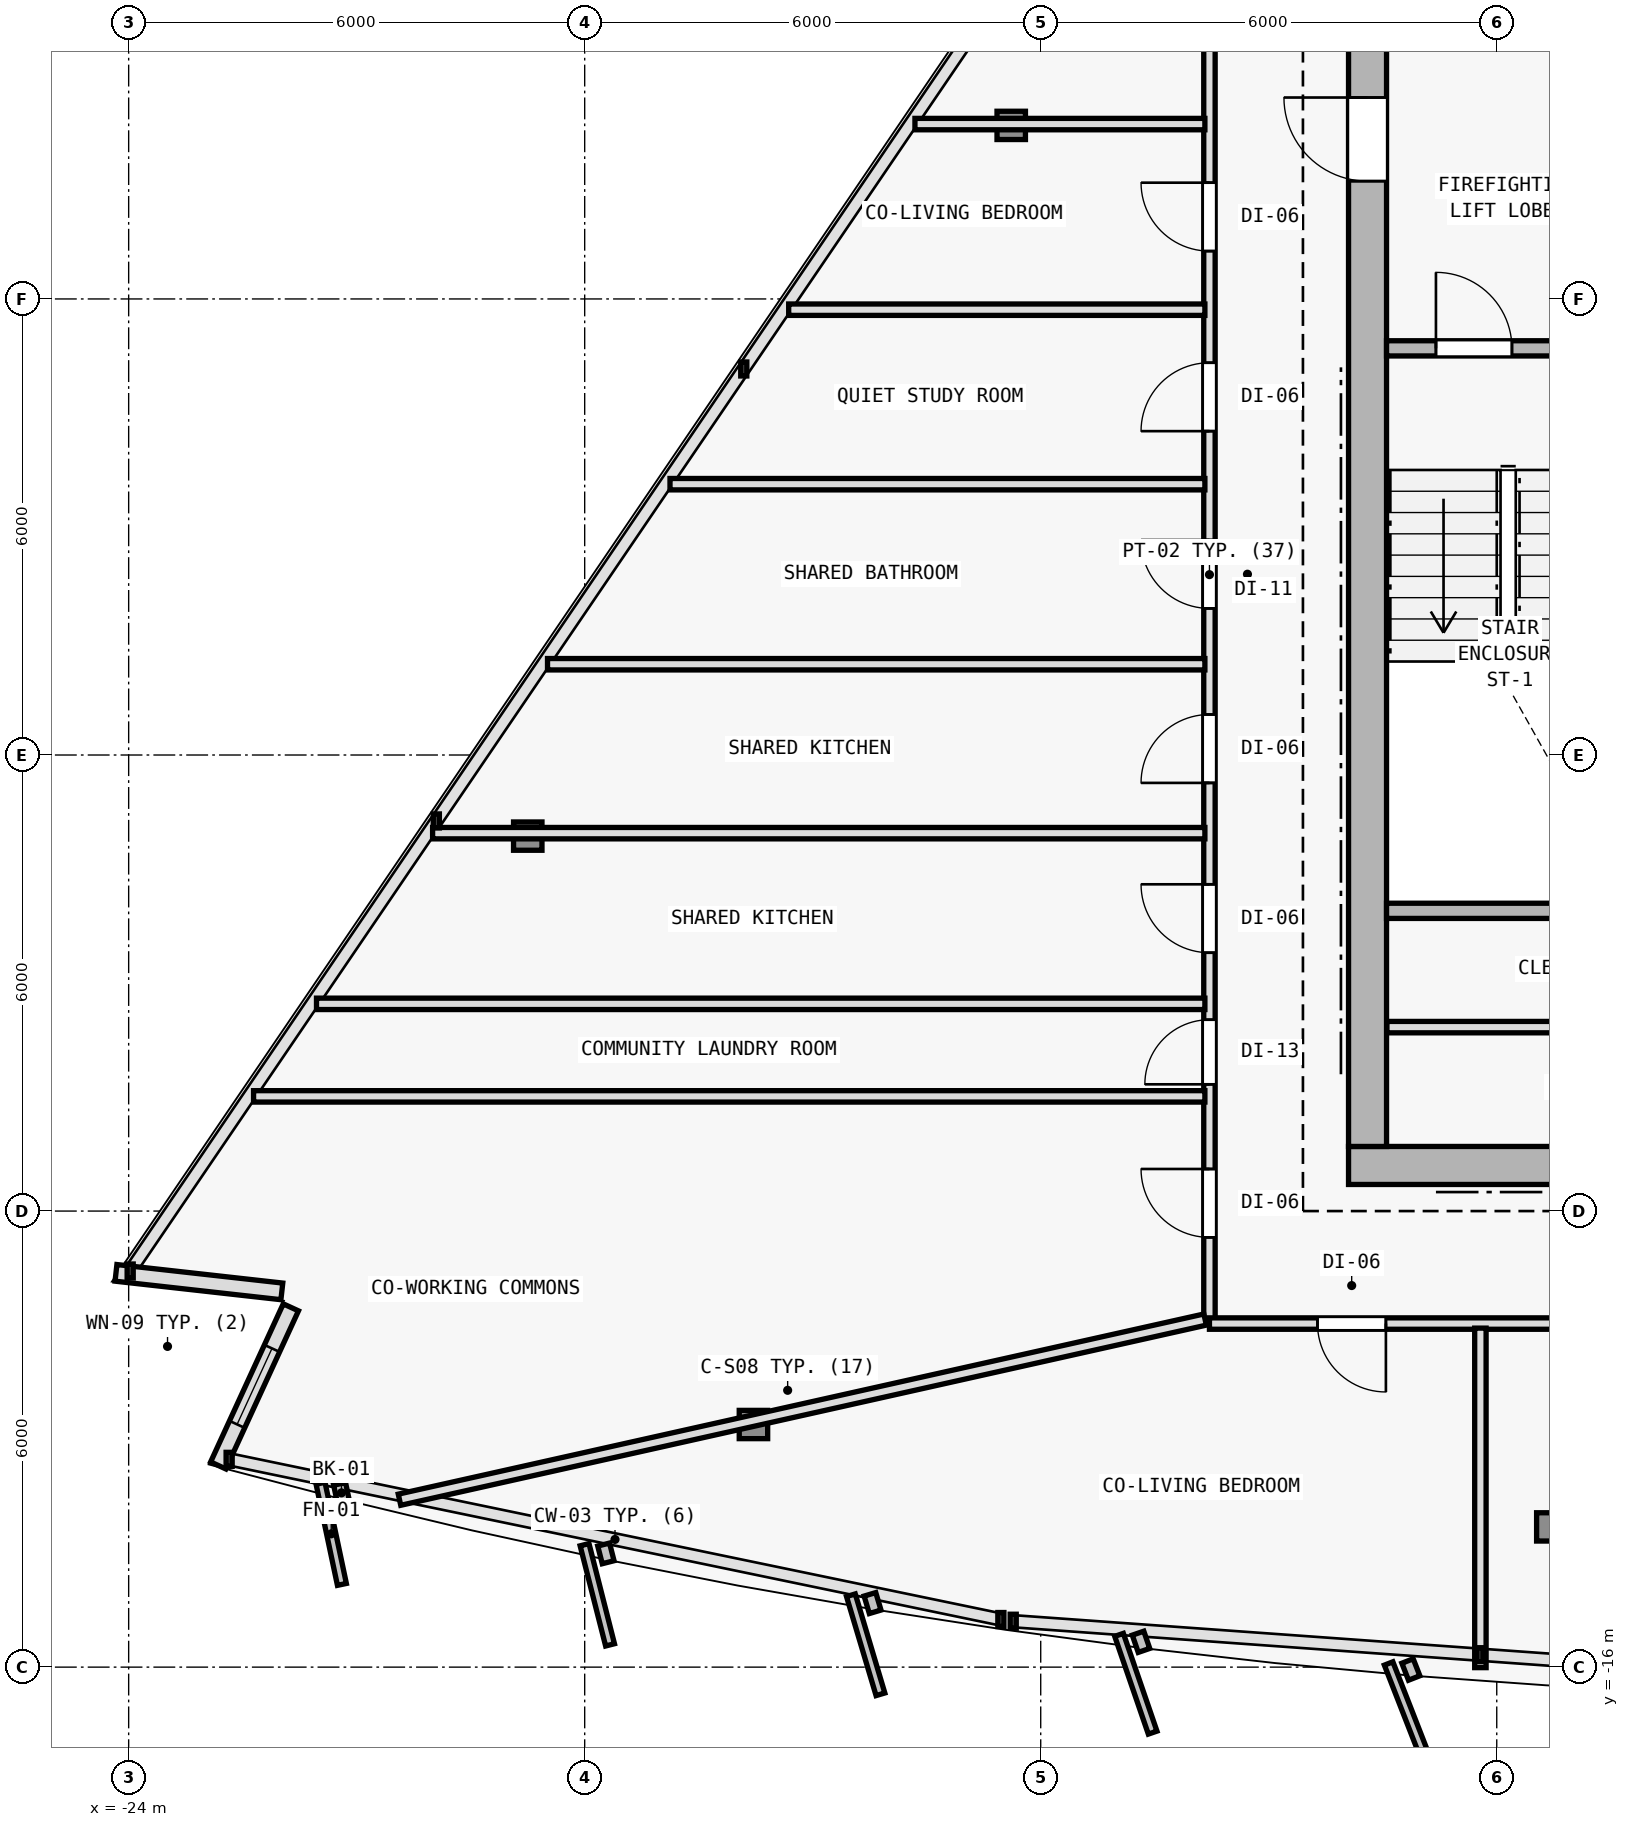
"""IFC4 building model, lengths in metres.
Left out: names, types, materials, properties, quantities, classifications, styles, units other than length and angle.
Written with IfcOpenShell. Run it as: python <this file> out.ifc"""

import sys

from ifc_helpers import new_model, si_unit, direction, frame, frame_2d, origin, origin_2d, place, context, subcontext, project, spatial, rectangle, i_section, extrude, element, fill, save


model = new_model("IFC4")
c1 = context("Model", 3, precision=1e-05, world=origin(), true_north=direction((0.0, 1.0)))
c2 = subcontext(c1, "Body", "Model", "MODEL_VIEW")
j1 = project(units=[si_unit("LENGTHUNIT", "METRE"), si_unit("PLANEANGLEUNIT", "RADIAN")], contexts=[c1])
p1 = place(None, origin())
s1 = spatial("IfcSite", under=j1, at=p1, CompositionType="ELEMENT")
p2 = place(p1, origin())
s2 = spatial("IfcBuilding", under=s1, at=p2, CompositionType="ELEMENT")
p3 = place(p2, frame((0.0, 0.0, 258.0)))
s3 = spatial("IfcBuildingStorey", under=s2, at=p3, CompositionType="ELEMENT", Elevation=258.0)
for number, where, z_axis, x_axis in (
    (1, (-7.7, -9.4, 0.0), (0.0, 0.0, 1.0), (1.0, 0.0, 0.0)),
    (2, (-7.7, 2.0, 0.0), (0.0, 0.0, 1.0), (1.0, 0.0, 0.0)),
):
    element("IfcColumn", number, at=place(p3, frame(where, z_axis=z_axis, x_axis=x_axis)), inside=s3, PredefinedType="COLUMN", context=c2, shape_type="SweptSolid", body=[
        extrude(i_section(OverallWidth=0.374, OverallDepth=0.372, WebThickness=0.012, FlangeThickness=0.02, FilletRadius=0.015, at=origin_2d()), origin(), (0.0, 0.0, 1.0), 3.6),
    ])
p4 = place(p3, frame((-15.78, -12.808, 0.006), z_axis=(0.020596292833, 0.033511459955, 0.999226087917), x_axis=(-0.851954850327, 0.523615252838, 0.0)))
e3 = element("IfcColumn", 3, at=p4, inside=s3, PredefinedType="COLUMN", context=c2, shape_type="SweptSolid", body=[
    extrude(i_section(OverallWidth=0.374, OverallDepth=0.372, WebThickness=0.012, FlangeThickness=0.02, FilletRadius=0.015, at=origin_2d()), origin(), (0.0, 0.0, 1.0), 3.592),
])
p5 = place(p3, frame((-5.289, -14.155, 0.006), z_axis=(0.006934288159, 0.035283289748, 0.999353293441), x_axis=(-0.981229659911, 0.192842823335, 0.0)))
e4 = element("IfcColumn", 4, at=p5, inside=s3, PredefinedType="COLUMN", context=c2, shape_type="SweptSolid", body=[
    extrude(i_section(OverallWidth=0.374, OverallDepth=0.372, WebThickness=0.012, FlangeThickness=0.02, FilletRadius=0.015, at=origin_2d()), origin(), (0.0, 0.0, 1.0), 3.591),
])
p6 = place(p3, frame((-12.388, 4.283, 0.006), z_axis=(0.017003572908, 0.009522000828, 0.999810086971), x_axis=(-0.488603368932, 0.87250601595, 0.0)))
e5 = element("IfcColumn", 5, at=p6, inside=s3, PredefinedType="COLUMN", context=c2, shape_type="SweptSolid", body=[
    extrude(i_section(OverallWidth=0.374, OverallDepth=0.372, WebThickness=0.012, FlangeThickness=0.02, FilletRadius=0.015, at=origin_2d()), origin(), (0.0, 0.0, 1.0), 3.59),
])
p7 = place(p3, frame((-18.749, -5.067, 0.006), z_axis=(0.025292109804, 0.02162067451, 0.999446274502), x_axis=(-0.649781149204, 0.760121344352, 0.0)))
e6 = element("IfcColumn", 6, at=p7, inside=s3, PredefinedType="COLUMN", context=c2, shape_type="SweptSolid", body=[
    extrude(i_section(OverallWidth=0.374, OverallDepth=0.372, WebThickness=0.012, FlangeThickness=0.02, FilletRadius=0.015, at=origin_2d()), origin(), (0.0, 0.0, 1.0), 3.591),
])
p8 = place(p3, frame((-21.985, -11.057, 0.0), z_axis=(0.0, 0.0, 1.0), x_axis=(-0.993823926228, 0.110968480463, 0.0)))
e7 = element("IfcWall", 7, at=p8, inside=s3, PredefinedType="SOLIDWALL", context=c2, shape_type="SweptSolid", body=[
    extrude(rectangle(XDim=2.196, YDim=0.22, at=frame_2d((1.098, 0.0))), origin(), (0.0, 0.0, 1.0), 3.35),
])
p9 = place(p3, frame((-22.822, -13.347, 0.0), z_axis=(0.0, 0.0, 1.0), x_axis=(0.417447808253, 0.908700900949, 0.0)))
e8 = element("IfcWall", 8, at=p9, inside=s3, PredefinedType="SOLIDWALL", context=c2, shape_type="SweptSolid", body=[
    extrude(rectangle(XDim=2.289, YDim=0.22, at=frame_2d((1.145, 0.0))), origin(), (0.0, 0.0, 1.0), 3.35),
])
p10 = place(p9, frame((0.594, 0.0, 0.62)))
e9 = element("IfcOpeningElement", 9, at=p10, cuts=e8, PredefinedType="OPENING", context=c2, shape_type="SweptSolid", body=[
    extrude(rectangle(XDim=1.1, YDim=1.8, at=frame_2d((0.55, 0.9))), frame((0.0, 0.12, 0.0), z_axis=(0.0, -1.0, 0.0), x_axis=(1.0, 0.0, 0.0)), (0.0, 0.0, 1.0), 0.24),
])
p11 = place(p3, frame((-7.95, -9.4, 0.0), z_axis=(0.0, 0.0, 1.0), x_axis=(1.0, 0.0, 0.0)))
e10 = element("IfcWall", 10, at=p11, inside=s3, PredefinedType="SHEAR", context=c2, shape_type="SweptSolid", body=[
    extrude(rectangle(XDim=15.9, YDim=0.5, at=frame_2d((7.95, 0.0))), origin(), (0.0, 0.0, 1.0), 3.35),
])
p12 = place(p11, frame((9.6, 0.0, 0.0)))
e11 = element("IfcOpeningElement", 11, at=p12, cuts=e10, PredefinedType="OPENING", context=c2, shape_type="SweptSolid", body=[
    extrude(rectangle(XDim=1.5, YDim=2.2, at=frame_2d((0.75, 1.1))), frame((0.0, 0.26, 0.0), z_axis=(0.0, -1.0, 0.0), x_axis=(1.0, 0.0, 0.0)), (0.0, 0.0, 1.0), 0.52),
])
p13 = place(p3, frame((-7.7, -9.15, 0.0), z_axis=(0.0, 0.0, 1.0), x_axis=(0.0, 1.0, 0.0)))
e12 = element("IfcWall", 12, at=p13, inside=s3, PredefinedType="SHEAR", context=c2, shape_type="SweptSolid", body=[
    extrude(rectangle(XDim=19.1, YDim=0.5, at=frame_2d((9.55, 0.0))), origin(), (0.0, 0.0, 1.0), 3.35),
])
p14 = place(p13, frame((12.7, 0.0, 0.0)))
e13 = element("IfcOpeningElement", 13, at=p14, cuts=e12, PredefinedType="OPENING", context=c2, shape_type="SweptSolid", body=[
    extrude(rectangle(XDim=1.1, YDim=2.15, at=frame_2d((0.55, 1.075))), frame((0.0, 0.26, 0.0), z_axis=(0.0, -1.0, 0.0), x_axis=(1.0, 0.0, 0.0)), (0.0, 0.0, 1.0), 0.52),
])
p15 = place(p3, frame((-7.45, 1.35, 0.0), z_axis=(0.0, 0.0, 1.0), x_axis=(1.0, 0.0, 0.0)))
e14 = element("IfcWall", 14, at=p15, inside=s3, PredefinedType="SOLIDWALL", context=c2, shape_type="SweptSolid", body=[
    extrude(rectangle(XDim=3.4, YDim=0.2, at=frame_2d((1.7, 0.0))), origin(), (0.0, 0.0, 1.0), 3.35),
])
p16 = place(p15, frame((0.65, 0.0, 0.0)))
e15 = element("IfcOpeningElement", 15, at=p16, cuts=e14, PredefinedType="OPENING", context=c2, shape_type="SweptSolid", body=[
    extrude(rectangle(XDim=1.0, YDim=2.15, at=frame_2d((0.5, 1.075))), frame((0.0, 0.11, 0.0), z_axis=(0.0, -1.0, 0.0), x_axis=(1.0, 0.0, 0.0)), (0.0, 0.0, 1.0), 0.22),
])
p17 = place(p3, frame((-7.45, -6.05, 0.0), z_axis=(0.0, 0.0, 1.0), x_axis=(1.0, 0.0, 0.0)))
e16 = element("IfcWall", 16, at=p17, inside=s3, PredefinedType="SOLIDWALL", context=c2, shape_type="SweptSolid", body=[
    extrude(rectangle(XDim=3.4, YDim=0.2, at=frame_2d((1.7, 0.0))), origin(), (0.0, 0.0, 1.0), 3.35),
])
p18 = place(p3, frame((-7.445, -7.58, 0.0), z_axis=(0.0, 0.0, 1.0), x_axis=(1.0, 0.0, 0.0)))
e17 = element("IfcWall", 17, at=p18, inside=s3, PredefinedType="PARTITIONING", context=c2, shape_type="SweptSolid", body=[
    extrude(rectangle(XDim=6.195, YDim=0.15, at=frame_2d((3.098, 0.0))), origin(), (0.0, 0.0, 1.0), 3.35),
])
p19 = place(p3, frame((-9.78, -11.48, 0.0), z_axis=(0.0, 0.0, 1.0), x_axis=(0.0, 1.0, 0.0)))
e18 = element("IfcWall", 18, at=p19, inside=s3, PredefinedType="PARTITIONING", context=c2, shape_type="SweptSolid", body=[
    extrude(rectangle(XDim=19.706, YDim=0.15, at=frame_2d((9.853, 0.0))), origin(), (0.0, 0.0, 1.0), 2.875),
])
p20 = place(p19, frame((9.409, 0.0, 0.0)))
e19 = element("IfcOpeningElement", 19, at=p20, cuts=e18, PredefinedType="OPENING", context=c2, shape_type="SweptSolid", body=[
    extrude(rectangle(XDim=0.9, YDim=2.1, at=frame_2d((0.45, 1.05))), frame((0.0, 0.085, 0.0), z_axis=(0.0, -1.0, 0.0), x_axis=(1.0, 0.0, 0.0)), (0.0, 0.0, 1.0), 0.17),
])
p21 = place(p19, frame((7.113, 0.0, 0.0)))
e20 = element("IfcOpeningElement", 20, at=p21, cuts=e18, PredefinedType="OPENING", context=c2, shape_type="SweptSolid", body=[
    extrude(rectangle(XDim=0.9, YDim=2.1, at=frame_2d((0.45, 1.05))), frame((0.0, 0.085, 0.0), z_axis=(0.0, -1.0, 0.0), x_axis=(1.0, 0.0, 0.0)), (0.0, 0.0, 1.0), 0.17),
])
p22 = place(p19, frame((4.879, 0.0, 0.0)))
e21 = element("IfcOpeningElement", 21, at=p22, cuts=e18, PredefinedType="OPENING", context=c2, shape_type="SweptSolid", body=[
    extrude(rectangle(XDim=0.9, YDim=2.1, at=frame_2d((0.45, 1.05))), frame((0.0, 0.085, 0.0), z_axis=(0.0, -1.0, 0.0), x_axis=(1.0, 0.0, 0.0)), (0.0, 0.0, 1.0), 0.17),
])
p23 = place(p19, frame((3.148, 0.0, 0.0)))
e22 = element("IfcOpeningElement", 22, at=p23, cuts=e18, PredefinedType="OPENING", context=c2, shape_type="SweptSolid", body=[
    extrude(rectangle(XDim=0.85, YDim=2.1, at=frame_2d((0.425, 1.05))), frame((0.0, 0.085, 0.0), z_axis=(0.0, -1.0, 0.0), x_axis=(1.0, 0.0, 0.0)), (0.0, 0.0, 1.0), 0.17),
])
p24 = place(p19, frame((1.134, 0.0, 0.0)))
e23 = element("IfcOpeningElement", 23, at=p24, cuts=e18, PredefinedType="OPENING", context=c2, shape_type="SweptSolid", body=[
    extrude(rectangle(XDim=0.9, YDim=2.1, at=frame_2d((0.45, 1.05))), frame((0.0, 0.085, 0.0), z_axis=(0.0, -1.0, 0.0), x_axis=(1.0, 0.0, 0.0)), (0.0, 0.0, 1.0), 0.17),
])
p25 = place(p19, frame((14.11, 0.0, 0.0)))
e24 = element("IfcOpeningElement", 24, at=p25, cuts=e18, PredefinedType="OPENING", context=c2, shape_type="SweptSolid", body=[
    extrude(rectangle(XDim=0.9, YDim=2.1, at=frame_2d((0.45, 1.05))), frame((0.0, 0.085, 0.0), z_axis=(0.0, -1.0, 0.0), x_axis=(1.0, 0.0, 0.0)), (0.0, 0.0, 1.0), 0.17),
])
p26 = place(p19, frame((11.741, 0.0, 0.0)))
e25 = element("IfcOpeningElement", 25, at=p26, cuts=e18, PredefinedType="OPENING", context=c2, shape_type="SweptSolid", body=[
    extrude(rectangle(XDim=0.9, YDim=2.1, at=frame_2d((0.45, 1.05))), frame((0.0, 0.085, 0.0), z_axis=(0.0, -1.0, 0.0), x_axis=(1.0, 0.0, 0.0)), (0.0, 0.0, 1.0), 0.17),
])
p27 = place(p3, frame((9.78, -11.48, 0.0), z_axis=(0.0, 0.0, 1.0), x_axis=(-1.0, 0.0, 0.0)))
e26 = element("IfcWall", 26, at=p27, inside=s3, PredefinedType="PARTITIONING", context=c2, shape_type="SweptSolid", body=[
    extrude(rectangle(XDim=19.56, YDim=0.15, at=frame_2d((9.78, 0.0))), origin(), (0.0, 0.0, 1.0), 2.725),
])
p28 = place(p27, frame((17.239, 0.0, 0.0)))
e27 = element("IfcOpeningElement", 27, at=p28, cuts=e26, PredefinedType="OPENING", context=c2, shape_type="SweptSolid", body=[
    extrude(rectangle(XDim=0.9, YDim=2.1, at=frame_2d((0.45, 1.05))), frame((0.0, 0.085, 0.0), z_axis=(0.0, -1.0, 0.0), x_axis=(1.0, 0.0, 0.0)), (0.0, 0.0, 1.0), 0.17),
])
p29 = place(p27, frame((9.8, 0.0, 0.0)))
e28 = element("IfcOpeningElement", 28, at=p29, cuts=e26, PredefinedType="OPENING", context=c2, shape_type="SweptSolid", body=[
    extrude(rectangle(XDim=0.9, YDim=2.1, at=frame_2d((0.45, 1.05))), frame((0.0, 0.085, 0.0), z_axis=(0.0, -1.0, 0.0), x_axis=(1.0, 0.0, 0.0)), (0.0, 0.0, 1.0), 0.17),
])
p30 = place(p27, frame((1.891, 0.0, 0.0)))
e29 = element("IfcOpeningElement", 29, at=p30, cuts=e26, PredefinedType="OPENING", context=c2, shape_type="SweptSolid", body=[
    extrude(rectangle(XDim=0.9, YDim=2.1, at=frame_2d((0.45, 1.05))), frame((0.0, 0.085, 0.0), z_axis=(0.0, -1.0, 0.0), x_axis=(1.0, 0.0, 0.0)), (0.0, 0.0, 1.0), 0.17),
])
p31 = place(p3, frame((-9.837, -11.427, 0.0), z_axis=(0.0, 0.0, 1.0), x_axis=(-0.975894754953, -0.218241671676, 0.0)))
e30 = element("IfcWall", 30, at=p31, inside=s3, PredefinedType="PARTITIONING", context=c2, shape_type="SweptSolid", body=[
    extrude(rectangle(XDim=10.861, YDim=0.15, at=frame_2d((5.431, 0.0))), origin(), (0.0, 0.0, 1.0), 2.995),
])
p32 = place(p3, frame((-9.84, 4.301, 0.0), z_axis=(0.0, 0.0, 1.0), x_axis=(-1.0, 0.0, 0.0)))
e31 = element("IfcWall", 31, at=p32, inside=s3, PredefinedType="PARTITIONING", context=c2, shape_type="SweptSolid", body=[
    extrude(rectangle(XDim=3.815, YDim=0.15, at=frame_2d((1.907, 0.0))), origin(), (0.0, 0.0, 1.0), 3.015),
])
p33 = place(p3, frame((-9.84, -5.028, 0.0), z_axis=(0.0, 0.0, 1.0), x_axis=(-1.0, 0.0, 0.0)))
e32 = element("IfcWall", 32, at=p33, inside=s3, PredefinedType="PARTITIONING", context=c2, shape_type="SweptSolid", body=[
    extrude(rectangle(XDim=10.161, YDim=0.15, at=frame_2d((5.081, 0.0))), origin(), (0.0, 0.0, 1.0), 2.875),
])
p34 = place(p3, frame((-9.84, -0.437, 0.0), z_axis=(0.0, 0.0, 1.0), x_axis=(-1.0, 0.0, 0.0)))
e33 = element("IfcWall", 33, at=p34, inside=s3, PredefinedType="PARTITIONING", context=c2, shape_type="SweptSolid", body=[
    extrude(rectangle(XDim=7.038, YDim=0.15, at=frame_2d((3.519, 0.0))), origin(), (0.0, 0.0, 1.0), 2.995),
])
p35 = place(p3, frame((-9.84, -8.491, 0.0), z_axis=(0.0, 0.0, 1.0), x_axis=(-1.0, 0.0, 0.0)))
e34 = element("IfcWall", 34, at=p35, inside=s3, PredefinedType="PARTITIONING", context=c2, shape_type="SweptSolid", body=[
    extrude(rectangle(XDim=12.517, YDim=0.15, at=frame_2d((6.258, 0.0))), origin(), (0.0, 0.0, 1.0), 2.875),
])
p36 = place(p3, frame((-9.84, -2.806, 0.0), z_axis=(0.0, 0.0, 1.0), x_axis=(-1.0, 0.0, 0.0)))
e35 = element("IfcWall", 35, at=p36, inside=s3, PredefinedType="PARTITIONING", context=c2, shape_type="SweptSolid", body=[
    extrude(rectangle(XDim=8.649, YDim=0.15, at=frame_2d((4.324, 0.0))), origin(), (0.0, 0.0, 1.0), 2.995),
])
p37 = place(p3, frame((-9.84, -7.274, 0.0), z_axis=(0.0, 0.0, 1.0), x_axis=(-1.0, 0.0, 0.0)))
e36 = element("IfcWall", 36, at=p37, inside=s3, PredefinedType="PARTITIONING", context=c2, shape_type="SweptSolid", body=[
    extrude(rectangle(XDim=11.688, YDim=0.15, at=frame_2d((5.844, 0.0))), origin(), (0.0, 0.0, 1.0), 2.875),
])
p38 = place(p3, frame((-6.215, -11.54, 0.0), z_axis=(0.0, 0.0, 1.0), x_axis=(0.0, -1.0, 0.0)))
e37 = element("IfcWall", 37, at=p38, inside=s3, PredefinedType="PARTITIONING", context=c2, shape_type="SweptSolid", body=[
    extrude(rectangle(XDim=4.467, YDim=0.15, at=frame_2d((2.233, 0.0))), origin(), (0.0, 0.0, 1.0), 2.995),
])
p39 = place(p3, frame((-9.84, 1.859, 0.0), z_axis=(0.0, 0.0, 1.0), x_axis=(-1.0, 0.0, 0.0)))
e38 = element("IfcWall", 38, at=p39, inside=s3, PredefinedType="PARTITIONING", context=c2, shape_type="SweptSolid", body=[
    extrude(rectangle(XDim=5.476, YDim=0.15, at=frame_2d((2.738, 0.0))), origin(), (0.0, 0.0, 1.0), 2.995),
])
p40 = place(p10, origin())
e39 = element("IfcWindow", 39, at=p40, inside=s3, PartitioningType="SINGLE_PANEL", PredefinedType="WINDOW", context=c2, shape_type="SweptSolid", body=[
    extrude(rectangle(XDim=1.1, YDim=1.8, at=frame_2d((0.55, 0.9))), frame((0.0, 0.03, 0.0), z_axis=(0.0, -1.0, 0.0), x_axis=(1.0, 0.0, 0.0)), (0.0, 0.0, 1.0), 0.06),
])
fill(e9, e39)
p41 = place(p14, origin())
e40 = element("IfcDoor", 40, at=p41, inside=s3, OperationType="SINGLE_SWING_RIGHT", PredefinedType="DOOR", context=c2, shape_type="SweptSolid", body=[
    extrude(rectangle(XDim=1.1, YDim=2.15, at=frame_2d((0.55, 1.075))), frame((0.0, 0.025, 0.0), z_axis=(0.0, -1.0, 0.0), x_axis=(1.0, 0.0, 0.0)), (0.0, 0.0, 1.0), 0.05),
])
fill(e13, e40)
p42 = place(p16, origin())
e41 = element("IfcDoor", 41, at=p42, inside=s3, OperationType="SINGLE_SWING_LEFT", PredefinedType="DOOR", context=c2, shape_type="SweptSolid", body=[
    extrude(rectangle(XDim=1.0, YDim=2.15, at=frame_2d((0.5, 1.075))), frame((0.0, 0.025, 0.0), z_axis=(0.0, -1.0, 0.0), x_axis=(1.0, 0.0, 0.0)), (0.0, 0.0, 1.0), 0.05),
])
fill(e15, e41)
p43 = place(p20, origin())
e42 = element("IfcDoor", 42, at=p43, inside=s3, OperationType="SINGLE_SWING_RIGHT", PredefinedType="DOOR", context=c2, shape_type="SweptSolid", body=[
    extrude(rectangle(XDim=0.9, YDim=2.1, at=frame_2d((0.45, 1.05))), frame((0.0, 0.025, 0.0), z_axis=(0.0, -1.0, 0.0), x_axis=(1.0, 0.0, 0.0)), (0.0, 0.0, 1.0), 0.05),
])
fill(e19, e42)
p44 = place(p21, origin())
e43 = element("IfcDoor", 43, at=p44, inside=s3, OperationType="SINGLE_SWING_LEFT", PredefinedType="DOOR", context=c2, shape_type="SweptSolid", body=[
    extrude(rectangle(XDim=0.9, YDim=2.1, at=frame_2d((0.45, 1.05))), frame((0.0, 0.025, 0.0), z_axis=(0.0, -1.0, 0.0), x_axis=(1.0, 0.0, 0.0)), (0.0, 0.0, 1.0), 0.05),
])
fill(e20, e43)
p45 = place(p22, origin())
e44 = element("IfcDoor", 44, at=p45, inside=s3, OperationType="SINGLE_SWING_RIGHT", PredefinedType="DOOR", context=c2, shape_type="SweptSolid", body=[
    extrude(rectangle(XDim=0.9, YDim=2.1, at=frame_2d((0.45, 1.05))), frame((0.0, 0.025, 0.0), z_axis=(0.0, -1.0, 0.0), x_axis=(1.0, 0.0, 0.0)), (0.0, 0.0, 1.0), 0.05),
])
fill(e21, e44)
p46 = place(p23, origin())
e45 = element("IfcDoor", 45, at=p46, inside=s3, OperationType="SINGLE_SWING_LEFT", PredefinedType="DOOR", context=c2, shape_type="SweptSolid", body=[
    extrude(rectangle(XDim=0.85, YDim=2.1, at=frame_2d((0.425, 1.05))), frame((0.0, 0.025, 0.0), z_axis=(0.0, -1.0, 0.0), x_axis=(1.0, 0.0, 0.0)), (0.0, 0.0, 1.0), 0.05),
])
fill(e22, e45)
p47 = place(p24, origin())
e46 = element("IfcDoor", 46, at=p47, inside=s3, OperationType="SINGLE_SWING_RIGHT", PredefinedType="DOOR", context=c2, shape_type="SweptSolid", body=[
    extrude(rectangle(XDim=0.9, YDim=2.1, at=frame_2d((0.45, 1.05))), frame((0.0, 0.025, 0.0), z_axis=(0.0, -1.0, 0.0), x_axis=(1.0, 0.0, 0.0)), (0.0, 0.0, 1.0), 0.05),
])
fill(e23, e46)
p48 = place(p28, origin())
e47 = element("IfcDoor", 47, at=p48, inside=s3, OperationType="SINGLE_SWING_LEFT", PredefinedType="DOOR", context=c2, shape_type="SweptSolid", body=[
    extrude(rectangle(XDim=0.9, YDim=2.1, at=frame_2d((0.45, 1.05))), frame((0.0, 0.025, 0.0), z_axis=(0.0, -1.0, 0.0), x_axis=(1.0, 0.0, 0.0)), (0.0, 0.0, 1.0), 0.05),
])
fill(e27, e47)
p49 = place(p25, origin())
e48 = element("IfcDoor", 48, at=p49, inside=s3, OperationType="SINGLE_SWING_RIGHT", PredefinedType="DOOR", context=c2, shape_type="SweptSolid", body=[
    extrude(rectangle(XDim=0.9, YDim=2.1, at=frame_2d((0.45, 1.05))), frame((0.0, 0.025, 0.0), z_axis=(0.0, -1.0, 0.0), x_axis=(1.0, 0.0, 0.0)), (0.0, 0.0, 1.0), 0.05),
])
fill(e24, e48)
p50 = place(p26, origin())
e49 = element("IfcDoor", 49, at=p50, inside=s3, OperationType="SINGLE_SWING_LEFT", PredefinedType="DOOR", context=c2, shape_type="SweptSolid", body=[
    extrude(rectangle(XDim=0.9, YDim=2.1, at=frame_2d((0.45, 1.05))), frame((0.0, 0.025, 0.0), z_axis=(0.0, -1.0, 0.0), x_axis=(1.0, 0.0, 0.0)), (0.0, 0.0, 1.0), 0.05),
])
fill(e25, e49)
save(model, sys.argv[1])
